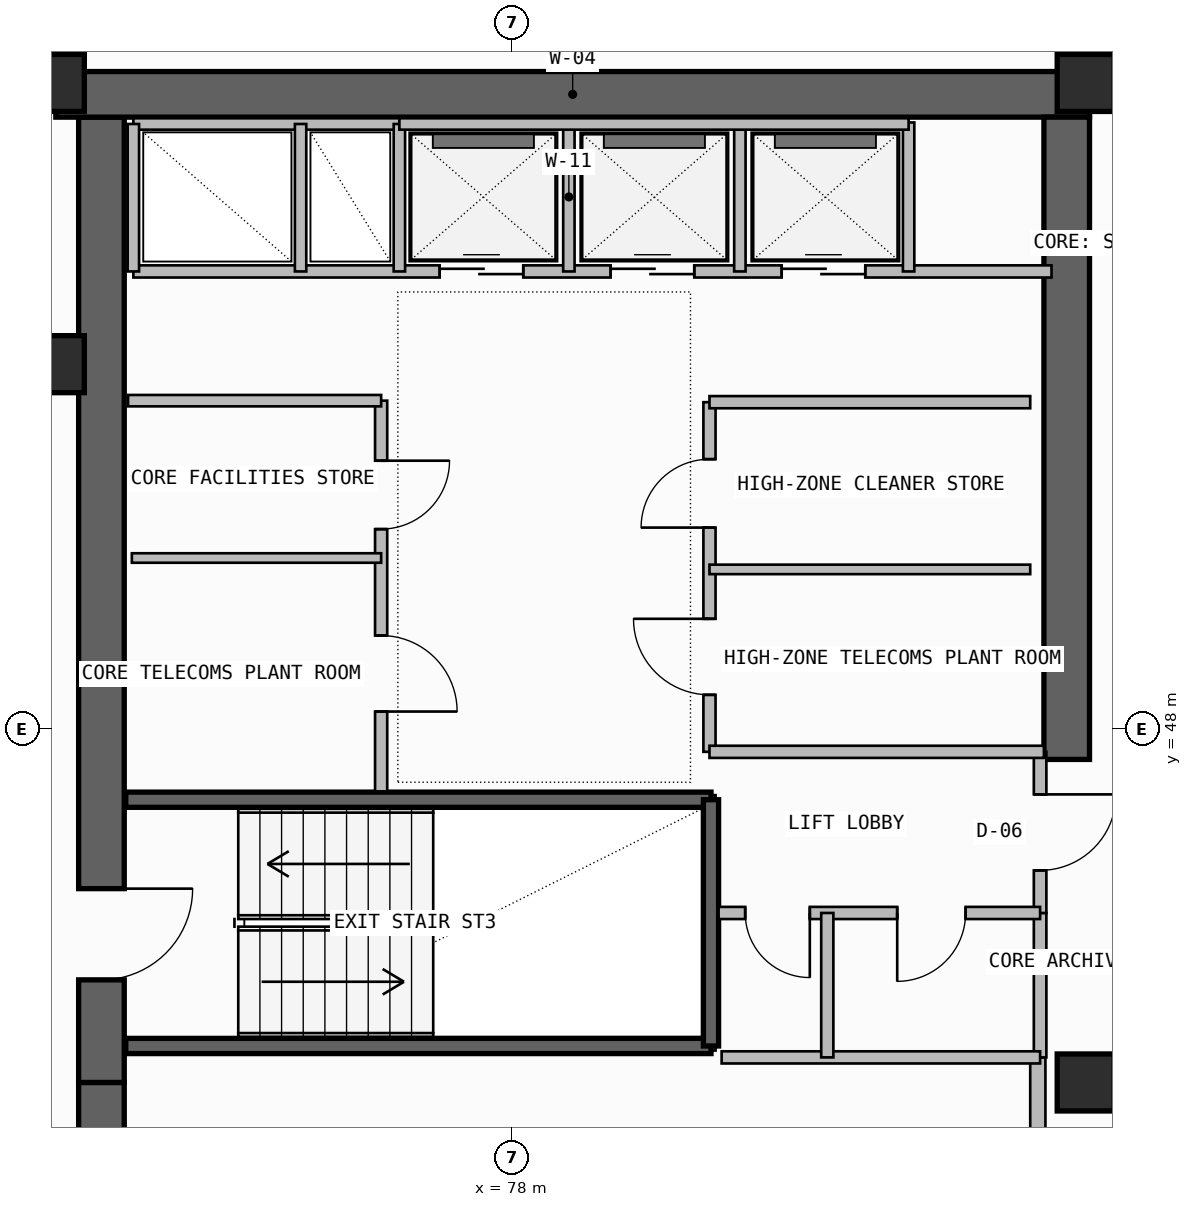
"""IFC4 building model, lengths in metres.
Left out: names, types, materials, properties, quantities, classifications, styles, units other than length and angle.
Written with IfcOpenShell. Run it as: python <this file> out.ifc"""

import sys

from ifc_helpers import new_model, si_unit, direction, frame, frame_2d, origin, origin_2d, place, context, subcontext, project, spatial, rectangle, extrude, element, fill, save


model = new_model("IFC4")
c1 = context("Model", 3, precision=1e-05, world=origin(), true_north=direction((0.0, 1.0)))
c2 = subcontext(c1, "Body", "Model", "MODEL_VIEW")
j1 = project(units=[si_unit("LENGTHUNIT", "METRE"), si_unit("PLANEANGLEUNIT", "RADIAN")], contexts=[c1])
p1 = place(None, origin())
s1 = spatial("IfcSite", under=j1, at=p1, CompositionType="ELEMENT")
p2 = place(p1, origin())
s2 = spatial("IfcBuilding", under=s1, at=p2, CompositionType="ELEMENT")
p3 = place(p2, frame((0.0, 0.0, 278.34)))
s3 = spatial("IfcBuildingStorey", under=s2, at=p3, CompositionType="ELEMENT", Elevation=278.34)
p4 = place(p3, frame((72.6, 35.5, -0.26), z_axis=(0.0, 0.0, 1.0), x_axis=(0.0, 1.0, 0.0)))
e1 = element("IfcWall", 1, at=p4, inside=s3, PredefinedType="SHEAR", context=c2, shape_type="SweptSolid", body=[
    extrude(rectangle(XDim=7.85, YDim=0.6, at=frame_2d((3.925, 0.0))), origin(), (0.0, 0.0, 1.0), 3.52),
])
p5 = place(p4, frame((1.45, 0.0, 0.26)))
e2 = element("IfcOpeningElement", 2, at=p5, cuts=e1, PredefinedType="OPENING", context=c2, shape_type="SweptSolid", body=[
    extrude(rectangle(XDim=1.2, YDim=2.2, at=frame_2d((0.6, 1.1))), frame((0.0, 0.31, 0.0), z_axis=(0.0, -1.0, 0.0), x_axis=(1.0, 0.0, 0.0)), (0.0, 0.0, 1.0), 0.62),
])
p6 = place(p3, frame((72.6, 43.35, -0.26), z_axis=(0.0, 0.0, 1.0), x_axis=(0.0, 1.0, 0.0)))
e3 = element("IfcWall", 3, at=p6, inside=s3, PredefinedType="SHEAR", context=c2, shape_type="SweptSolid", body=[
    extrude(rectangle(XDim=12.7, YDim=0.6, at=frame_2d((6.35, 0.0))), origin(), (0.0, 0.0, 1.0), 3.52),
])
p7 = place(p6, frame((1.35, 0.0, 0.26)))
e4 = element("IfcOpeningElement", 4, at=p7, cuts=e3, PredefinedType="OPENING", context=c2, shape_type="SweptSolid", body=[
    extrude(rectangle(XDim=1.2, YDim=2.2, at=frame_2d((0.6, 1.1))), frame((0.0, 0.31, 0.0), z_axis=(0.0, -1.0, 0.0), x_axis=(1.0, 0.0, 0.0)), (0.0, 0.0, 1.0), 0.62),
])
p8 = place(p3, frame((72.0, 56.35, -0.26), z_axis=(0.0, 0.0, 1.0), x_axis=(1.0, 0.0, 0.0)))
e5 = element("IfcWall", 5, at=p8, inside=s3, PredefinedType="SHEAR", context=c2, shape_type="SweptSolid", body=[
    extrude(rectangle(XDim=13.6, YDim=0.6, at=frame_2d((6.8, 0.0))), origin(), (0.0, 0.0, 1.0), 3.52),
])
p9 = place(p3, frame((85.3, 47.6, -0.26), z_axis=(0.0, 0.0, 1.0), x_axis=(0.0, 1.0, 0.0)))
e6 = element("IfcWall", 6, at=p9, inside=s3, PredefinedType="SHEAR", context=c2, shape_type="SweptSolid", body=[
    extrude(rectangle(XDim=8.45, YDim=0.6, at=frame_2d((4.225, 0.0))), origin(), (0.0, 0.0, 1.0), 3.52),
])
for number, where, z_axis, x_axis in (
    (7, (85.55, 43.35, 0.0), (0.0, 0.0, 1.0), (1.0, 0.0, 0.0)),
    (8, (72.0, 52.8, 0.0), (0.0, 0.0, 1.0), (1.0, 0.0, 0.0)),
    (9, (72.0, 56.5, 0.0), (0.0, 0.0, 1.0), (1.0, 0.0, 0.0)),
    (10, (85.55, 56.5, 0.0), (0.0, 0.0, 1.0), (1.0, 0.0, 0.0)),
):
    element("IfcColumn", number, at=place(p3, frame(where, z_axis=z_axis, x_axis=x_axis)), inside=s3, PredefinedType="COLUMN", context=c2, shape_type="SweptSolid", body=[
        extrude(rectangle(XDim=0.75, YDim=0.75, at=origin_2d()), origin(), (0.0, 0.0, 1.0), 3.52),
    ])
p10 = place(p3, frame((84.92, 38.85, 0.0), z_axis=(0.0, 0.0, 1.0), x_axis=(0.0, 1.0, 0.0)))
e11 = element("IfcWall", 11, at=p10, inside=s3, PredefinedType="SOLIDWALL", context=c2, shape_type="SweptSolid", body=[
    extrude(rectangle(XDim=4.83, YDim=0.2, at=frame_2d((2.415, 0.0))), origin(), (0.0, 0.0, 1.0), 3.26),
])
p11 = place(p10, frame((1.25, 0.0, 0.0)))
e12 = element("IfcOpeningElement", 12, at=p11, cuts=e11, PredefinedType="OPENING", context=c2, shape_type="SweptSolid", body=[
    extrude(rectangle(XDim=1.1, YDim=2.2, at=frame_2d((0.55, 1.1))), frame((0.0, 0.11, 0.0), z_axis=(0.0, -1.0, 0.0), x_axis=(1.0, 0.0, 0.0)), (0.0, 0.0, 1.0), 0.22),
])
for number, where, z_axis, x_axis in (
    (13, (72.92, 43.83, -0.26), (0.0, 0.0, 1.0), (1.0, 0.0, 0.0)),
    (14, (72.92, 47.07, -0.26), (0.0, 0.0, 1.0), (1.0, 0.0, 0.0)),
):
    element("IfcWall", number, at=place(p3, frame(where, z_axis=z_axis, x_axis=x_axis)), inside=s3, PredefinedType="SOLIDWALL", context=c2, shape_type="SweptSolid", body=[
        extrude(rectangle(XDim=7.7, YDim=0.2, at=frame_2d((3.85, 0.0))), origin(), (0.0, 0.0, 1.0), 3.52),
    ])
p12 = place(p3, frame((80.62, 43.83, -0.26), z_axis=(0.0, 0.0, 1.0), x_axis=(0.0, 1.0, 0.0)))
e15 = element("IfcWall", 15, at=p12, inside=s3, PredefinedType="SOLIDWALL", context=c2, shape_type="SweptSolid", body=[
    extrude(rectangle(XDim=3.24, YDim=0.2, at=frame_2d((1.62, 0.0))), origin(), (0.0, 0.0, 1.0), 3.52),
])
p13 = place(p3, frame((84.95, 43.68, 0.0), z_axis=(0.0, 0.0, 1.0), x_axis=(0.0, 1.0, 0.0)))
e16 = element("IfcWall", 16, at=p13, inside=s3, PredefinedType="PLUMBINGWALL", context=c2, shape_type="SweptSolid", body=[
    extrude(rectangle(XDim=1.9, YDim=0.165, at=frame_2d((0.95, 0.0))), origin(), (0.0, 0.0, 1.0), 3.26),
])
p14 = place(p3, frame((84.95, 45.58, 0.0), z_axis=(0.0, 0.0, 1.0), x_axis=(0.0, 1.0, 0.0)))
e17 = element("IfcWall", 17, at=p14, inside=s3, PredefinedType="PARTITIONING", context=c2, shape_type="SweptSolid", body=[
    extrude(rectangle(XDim=2.12, YDim=0.165, at=frame_2d((1.06, 0.0))), origin(), (0.0, 0.0, 1.0), 3.26),
])
p15 = place(p14, frame((0.56, 0.0, 0.0)))
e18 = element("IfcOpeningElement", 18, at=p15, cuts=e17, PredefinedType="OPENING", context=c2, shape_type="SweptSolid", body=[
    extrude(rectangle(XDim=1.0, YDim=2.2, at=frame_2d((0.5, 1.1))), frame((0.0, 0.093, 0.0), z_axis=(0.0, -1.0, 0.0), x_axis=(1.0, 0.0, 0.0)), (0.0, 0.0, 1.0), 0.185),
])
p16 = place(p3, frame((80.72, 45.58, 0.0), z_axis=(0.0, 0.0, 1.0), x_axis=(1.0, 0.0, 0.0)))
e19 = element("IfcWall", 19, at=p16, inside=s3, PredefinedType="PLUMBINGWALL", context=c2, shape_type="SweptSolid", body=[
    extrude(rectangle(XDim=4.23, YDim=0.16, at=frame_2d((2.115, 0.0))), origin(), (0.0, 0.0, 1.0), 3.26),
])
p17 = place(p16, frame((0.35, 0.0, 0.0)))
e20 = element("IfcOpeningElement", 20, at=p17, cuts=e19, PredefinedType="OPENING", context=c2, shape_type="SweptSolid", body=[
    extrude(rectangle(XDim=0.85, YDim=2.05, at=frame_2d((0.425, 1.025))), frame((0.0, 0.09, 0.0), z_axis=(0.0, -1.0, 0.0), x_axis=(1.0, 0.0, 0.0)), (0.0, 0.0, 1.0), 0.18),
])
p18 = place(p16, frame((2.35, 0.0, 0.0)))
e21 = element("IfcOpeningElement", 21, at=p18, cuts=e19, PredefinedType="OPENING", context=c2, shape_type="SweptSolid", body=[
    extrude(rectangle(XDim=0.9, YDim=2.1, at=frame_2d((0.45, 1.05))), frame((0.0, 0.09, 0.0), z_axis=(0.0, -1.0, 0.0), x_axis=(1.0, 0.0, 0.0)), (0.0, 0.0, 1.0), 0.18),
])
p19 = place(p3, frame((80.76, 43.68, 0.0), z_axis=(0.0, 0.0, 1.0), x_axis=(1.0, 0.0, 0.0)))
e22 = element("IfcWall", 22, at=p19, inside=s3, PredefinedType="PLUMBINGWALL", context=c2, shape_type="SweptSolid", body=[
    extrude(rectangle(XDim=4.19, YDim=0.16, at=frame_2d((2.095, 0.0))), origin(), (0.0, 0.0, 1.0), 3.26),
])
p20 = place(p3, frame((82.15, 43.68, 0.0), z_axis=(0.0, 0.0, 1.0), x_axis=(0.0, 1.0, 0.0)))
e23 = element("IfcWall", 23, at=p20, inside=s3, PredefinedType="PLUMBINGWALL", context=c2, shape_type="SweptSolid", body=[
    extrude(rectangle(XDim=1.9, YDim=0.16, at=frame_2d((0.95, 0.0))), origin(), (0.0, 0.0, 1.0), 3.26),
])
p21 = place(p3, frame((76.28, 47.18, 0.0), z_axis=(0.0, 0.0, 1.0), x_axis=(0.0, 1.0, 0.0)))
e24 = element("IfcWall", 24, at=p21, inside=s3, PredefinedType="SOLIDWALL", context=c2, shape_type="SweptSolid", body=[
    extrude(rectangle(XDim=5.14, YDim=0.16, at=frame_2d((2.57, 0.0))), origin(), (0.0, 0.0, 1.0), 3.26),
])
p22 = place(p21, frame((1.05, 0.0, 0.0)))
e25 = element("IfcOpeningElement", 25, at=p22, cuts=e24, PredefinedType="OPENING", context=c2, shape_type="SweptSolid", body=[
    extrude(rectangle(XDim=1.0, YDim=2.2, at=frame_2d((0.5, 1.1))), frame((0.0, 0.09, 0.0), z_axis=(0.0, -1.0, 0.0), x_axis=(1.0, 0.0, 0.0)), (0.0, 0.0, 1.0), 0.18),
])
p23 = place(p21, frame((3.45, 0.0, 0.0)))
e26 = element("IfcOpeningElement", 26, at=p23, cuts=e24, PredefinedType="OPENING", context=c2, shape_type="SweptSolid", body=[
    extrude(rectangle(XDim=0.9, YDim=2.1, at=frame_2d((0.45, 1.05))), frame((0.0, 0.09, 0.0), z_axis=(0.0, -1.0, 0.0), x_axis=(1.0, 0.0, 0.0)), (0.0, 0.0, 1.0), 0.18),
])
p24 = place(p3, frame((72.95, 52.32, 0.0), z_axis=(0.0, 0.0, 1.0), x_axis=(1.0, 0.0, 0.0)))
e27 = element("IfcWall", 27, at=p24, inside=s3, PredefinedType="SOLIDWALL", context=c2, shape_type="SweptSolid", body=[
    extrude(rectangle(XDim=3.33, YDim=0.15, at=frame_2d((1.665, 0.0))), origin(), (0.0, 0.0, 1.0), 3.26),
])
p25 = place(p3, frame((73.0, 50.25, 0.0), z_axis=(0.0, 0.0, 1.0), x_axis=(1.0, 0.0, 0.0)))
e28 = element("IfcWall", 28, at=p25, inside=s3, PredefinedType="PARTITIONING", context=c2, shape_type="SweptSolid", body=[
    extrude(rectangle(XDim=3.28, YDim=0.125, at=frame_2d((1.64, 0.0))), origin(), (0.0, 0.0, 1.0), 3.26),
])
p26 = place(p3, frame((80.6, 47.7, 0.0), z_axis=(0.0, 0.0, 1.0), x_axis=(0.0, 1.0, 0.0)))
e29 = element("IfcWall", 29, at=p26, inside=s3, PredefinedType="SOLIDWALL", context=c2, shape_type="SweptSolid", body=[
    extrude(rectangle(XDim=4.6, YDim=0.16, at=frame_2d((2.3, 0.0))), origin(), (0.0, 0.0, 1.0), 3.26),
])
p27 = place(p26, frame((0.75, 0.0, 0.0)))
e30 = element("IfcOpeningElement", 30, at=p27, cuts=e29, PredefinedType="OPENING", context=c2, shape_type="SweptSolid", body=[
    extrude(rectangle(XDim=1.0, YDim=2.2, at=frame_2d((0.5, 1.1))), frame((0.0, 0.09, 0.0), z_axis=(0.0, -1.0, 0.0), x_axis=(1.0, 0.0, 0.0)), (0.0, 0.0, 1.0), 0.18),
])
p28 = place(p26, frame((2.95, 0.0, 0.0)))
e31 = element("IfcOpeningElement", 31, at=p28, cuts=e29, PredefinedType="OPENING", context=c2, shape_type="SweptSolid", body=[
    extrude(rectangle(XDim=0.9, YDim=2.1, at=frame_2d((0.45, 1.05))), frame((0.0, 0.09, 0.0), z_axis=(0.0, -1.0, 0.0), x_axis=(1.0, 0.0, 0.0)), (0.0, 0.0, 1.0), 0.18),
])
p29 = place(p3, frame((80.6, 47.7, 0.0), z_axis=(0.0, 0.0, 1.0), x_axis=(1.0, 0.0, 0.0)))
e32 = element("IfcWall", 32, at=p29, inside=s3, PredefinedType="SOLIDWALL", context=c2, shape_type="SweptSolid", body=[
    extrude(rectangle(XDim=4.4, YDim=0.16, at=frame_2d((2.2, 0.0))), origin(), (0.0, 0.0, 1.0), 3.26),
])
p30 = place(p3, frame((80.6, 52.3, 0.0), z_axis=(0.0, 0.0, 1.0), x_axis=(1.0, 0.0, 0.0)))
e33 = element("IfcWall", 33, at=p30, inside=s3, PredefinedType="SOLIDWALL", context=c2, shape_type="SweptSolid", body=[
    extrude(rectangle(XDim=4.22, YDim=0.16, at=frame_2d((2.11, 0.0))), origin(), (0.0, 0.0, 1.0), 3.26),
])
p31 = place(p3, frame((80.6, 50.1, 0.0), z_axis=(0.0, 0.0, 1.0), x_axis=(1.0, 0.0, 0.0)))
e34 = element("IfcWall", 34, at=p31, inside=s3, PredefinedType="PARTITIONING", context=c2, shape_type="SweptSolid", body=[
    extrude(rectangle(XDim=4.22, YDim=0.125, at=frame_2d((2.11, 0.0))), origin(), (0.0, 0.0, 1.0), 3.26),
])
p32 = place(p3, frame((73.02, 54.02, 0.0), z_axis=(0.0, 0.0, 1.0), x_axis=(1.0, 0.0, 0.0)))
e35 = element("IfcWall", 35, at=p32, inside=s3, PredefinedType="SOLIDWALL", context=c2, shape_type="SweptSolid", body=[
    extrude(rectangle(XDim=12.08, YDim=0.16, at=frame_2d((6.04, 0.0))), origin(), (0.0, 0.0, 1.0), 3.26),
])
p33 = place(p32, frame((4.03, 0.0, 0.0)))
e36 = element("IfcOpeningElement", 36, at=p33, cuts=e35, PredefinedType="OPENING", context=c2, shape_type="SweptSolid", body=[
    extrude(rectangle(XDim=1.1, YDim=2.25, at=frame_2d((0.55, 1.125))), frame((0.0, 0.09, 0.0), z_axis=(0.0, -1.0, 0.0), x_axis=(1.0, 0.0, 0.0)), (0.0, 0.0, 1.0), 0.18),
])
p34 = place(p32, frame((6.28, 0.0, 0.0)))
e37 = element("IfcOpeningElement", 37, at=p34, cuts=e35, PredefinedType="OPENING", context=c2, shape_type="SweptSolid", body=[
    extrude(rectangle(XDim=1.1, YDim=2.25, at=frame_2d((0.55, 1.125))), frame((0.0, 0.09, 0.0), z_axis=(0.0, -1.0, 0.0), x_axis=(1.0, 0.0, 0.0)), (0.0, 0.0, 1.0), 0.18),
])
p35 = place(p32, frame((8.53, 0.0, 0.0)))
e38 = element("IfcOpeningElement", 38, at=p35, cuts=e35, PredefinedType="OPENING", context=c2, shape_type="SweptSolid", body=[
    extrude(rectangle(XDim=1.1, YDim=2.25, at=frame_2d((0.55, 1.125))), frame((0.0, 0.09, 0.0), z_axis=(0.0, -1.0, 0.0), x_axis=(1.0, 0.0, 0.0)), (0.0, 0.0, 1.0), 0.18),
])
p36 = place(p3, frame((73.02, 55.96, 0.0), z_axis=(0.0, 0.0, 1.0), x_axis=(1.0, 0.0, 0.0)))
e39 = element("IfcWall", 39, at=p36, inside=s3, PredefinedType="SOLIDWALL", context=c2, shape_type="SweptSolid", body=[
    extrude(rectangle(XDim=3.5, YDim=0.15, at=frame_2d((1.75, 0.0))), origin(), (0.0, 0.0, 1.0), 3.26),
])
p37 = place(p3, frame((73.02, 54.02, 0.0), z_axis=(0.0, 0.0, 1.0), x_axis=(0.0, 1.0, 0.0)))
e40 = element("IfcWall", 40, at=p37, inside=s3, PredefinedType="PLUMBINGWALL", context=c2, shape_type="SweptSolid", body=[
    extrude(rectangle(XDim=1.94, YDim=0.15, at=frame_2d((0.97, 0.0))), origin(), (0.0, 0.0, 1.0), 3.26),
])
p38 = place(p3, frame((76.52, 54.02, 0.0), z_axis=(0.0, 0.0, 1.0), x_axis=(0.0, 1.0, 0.0)))
e41 = element("IfcWall", 41, at=p38, inside=s3, PredefinedType="SOLIDWALL", context=c2, shape_type="SweptSolid", body=[
    extrude(rectangle(XDim=1.94, YDim=0.15, at=frame_2d((0.97, 0.0))), origin(), (0.0, 0.0, 1.0), 3.26),
])
p39 = place(p3, frame((75.22, 54.02, 0.0), z_axis=(0.0, 0.0, 1.0), x_axis=(0.0, 1.0, 0.0)))
e42 = element("IfcWall", 42, at=p39, inside=s3, PredefinedType="PLUMBINGWALL", context=c2, shape_type="SweptSolid", body=[
    extrude(rectangle(XDim=1.94, YDim=0.15, at=frame_2d((0.97, 0.0))), origin(), (0.0, 0.0, 1.0), 3.26),
])
for number, where, z_axis, x_axis in (
    (43, (78.75, 54.02, 0.0), (0.0, 0.0, 1.0), (0.0, 1.0, 0.0)),
    (44, (81.0, 54.02, 0.0), (0.0, 0.0, 1.0), (0.0, 1.0, 0.0)),
):
    element("IfcWall", number, at=place(p3, frame(where, z_axis=z_axis, x_axis=x_axis)), inside=s3, PredefinedType="PLUMBINGWALL", context=c2, shape_type="SweptSolid", body=[
        extrude(rectangle(XDim=1.96, YDim=0.15, at=frame_2d((0.98, 0.0))), origin(), (0.0, 0.0, 1.0), 3.26),
    ])
p40 = place(p3, frame((83.22, 54.02, 0.0), z_axis=(0.0, 0.0, 1.0), x_axis=(0.0, 1.0, 0.0)))
e45 = element("IfcWall", 45, at=p40, inside=s3, PredefinedType="SOLIDWALL", context=c2, shape_type="SweptSolid", body=[
    extrude(rectangle(XDim=1.96, YDim=0.15, at=frame_2d((0.98, 0.0))), origin(), (0.0, 0.0, 1.0), 3.26),
])
p41 = place(p3, frame((76.52, 55.96, 0.0), z_axis=(0.0, 0.0, 1.0), x_axis=(1.0, 0.0, 0.0)))
e46 = element("IfcWall", 46, at=p41, inside=s3, PredefinedType="SOLIDWALL", context=c2, shape_type="SweptSolid", body=[
    extrude(rectangle(XDim=6.7, YDim=0.15, at=frame_2d((3.35, 0.0))), origin(), (0.0, 0.0, 1.0), 3.26),
])
p42 = place(p7, frame((1.2, 0.0, 0.0), z_axis=(0.0, 0.0, 1.0), x_axis=(-1.0, 0.0, 0.0)))
e47 = element("IfcDoor", 47, at=p42, inside=s3, OperationType="SINGLE_SWING_LEFT", PredefinedType="USERDEFINED", context=c2, shape_type="SweptSolid", body=[
    extrude(rectangle(XDim=1.2, YDim=2.2, at=frame_2d((0.6, 1.1))), frame((0.0, 0.025, 0.0), z_axis=(0.0, -1.0, 0.0), x_axis=(1.0, 0.0, 0.0)), (0.0, 0.0, 1.0), 0.05),
])
fill(e4, e47)
p43 = place(p15, frame((1.0, 0.0, 0.0), z_axis=(0.0, 0.0, 1.0), x_axis=(-1.0, 0.0, 0.0)))
e48 = element("IfcDoor", 48, at=p43, inside=s3, OperationType="SINGLE_SWING_LEFT", PredefinedType="DOOR", context=c2, shape_type="SweptSolid", body=[
    extrude(rectangle(XDim=1.0, YDim=2.2, at=frame_2d((0.5, 1.1))), frame((0.0, 0.025, 0.0), z_axis=(0.0, -1.0, 0.0), x_axis=(1.0, 0.0, 0.0)), (0.0, 0.0, 1.0), 0.05),
])
fill(e18, e48)
p44 = place(p17, frame((0.85, 0.0, 0.0), z_axis=(0.0, 0.0, 1.0), x_axis=(-1.0, 0.0, 0.0)))
e49 = element("IfcDoor", 49, at=p44, inside=s3, OperationType="SINGLE_SWING_LEFT", PredefinedType="DOOR", context=c2, shape_type="SweptSolid", body=[
    extrude(rectangle(XDim=0.85, YDim=2.05, at=frame_2d((0.425, 1.025))), frame((0.0, 0.025, 0.0), z_axis=(0.0, -1.0, 0.0), x_axis=(1.0, 0.0, 0.0)), (0.0, 0.0, 1.0), 0.05),
])
fill(e20, e49)
p45 = place(p18, frame((0.9, 0.0, 0.0), z_axis=(0.0, 0.0, 1.0), x_axis=(-1.0, 0.0, 0.0)))
e50 = element("IfcDoor", 50, at=p45, inside=s3, OperationType="SINGLE_SWING_RIGHT", PredefinedType="DOOR", context=c2, shape_type="SweptSolid", body=[
    extrude(rectangle(XDim=0.9, YDim=2.1, at=frame_2d((0.45, 1.05))), frame((0.0, 0.025, 0.0), z_axis=(0.0, -1.0, 0.0), x_axis=(1.0, 0.0, 0.0)), (0.0, 0.0, 1.0), 0.05),
])
fill(e21, e50)
p46 = place(p22, frame((1.0, 0.0, 0.0), z_axis=(0.0, 0.0, 1.0), x_axis=(-1.0, 0.0, 0.0)))
e51 = element("IfcDoor", 51, at=p46, inside=s3, OperationType="SINGLE_SWING_RIGHT", PredefinedType="DOOR", context=c2, shape_type="SweptSolid", body=[
    extrude(rectangle(XDim=1.0, YDim=2.2, at=frame_2d((0.5, 1.1))), frame((0.0, 0.025, 0.0), z_axis=(0.0, -1.0, 0.0), x_axis=(1.0, 0.0, 0.0)), (0.0, 0.0, 1.0), 0.05),
])
fill(e25, e51)
p47 = place(p23, frame((0.9, 0.0, 0.0), z_axis=(0.0, 0.0, 1.0), x_axis=(-1.0, 0.0, 0.0)))
e52 = element("IfcDoor", 52, at=p47, inside=s3, OperationType="SINGLE_SWING_LEFT", PredefinedType="DOOR", context=c2, shape_type="SweptSolid", body=[
    extrude(rectangle(XDim=0.9, YDim=2.1, at=frame_2d((0.45, 1.05))), frame((0.0, 0.025, 0.0), z_axis=(0.0, -1.0, 0.0), x_axis=(1.0, 0.0, 0.0)), (0.0, 0.0, 1.0), 0.05),
])
fill(e26, e52)
p48 = place(p27, origin())
e53 = element("IfcDoor", 53, at=p48, inside=s3, OperationType="SINGLE_SWING_RIGHT", PredefinedType="DOOR", context=c2, shape_type="SweptSolid", body=[
    extrude(rectangle(XDim=1.0, YDim=2.2, at=frame_2d((0.5, 1.1))), frame((0.0, 0.025, 0.0), z_axis=(0.0, -1.0, 0.0), x_axis=(1.0, 0.0, 0.0)), (0.0, 0.0, 1.0), 0.05),
])
fill(e30, e53)
p49 = place(p28, origin())
e54 = element("IfcDoor", 54, at=p49, inside=s3, OperationType="SINGLE_SWING_LEFT", PredefinedType="DOOR", context=c2, shape_type="SweptSolid", body=[
    extrude(rectangle(XDim=0.9, YDim=2.1, at=frame_2d((0.45, 1.05))), frame((0.0, 0.025, 0.0), z_axis=(0.0, -1.0, 0.0), x_axis=(1.0, 0.0, 0.0)), (0.0, 0.0, 1.0), 0.05),
])
fill(e31, e54)
p50 = place(p33, origin())
e55 = element("IfcDoor", 55, at=p50, inside=s3, OperationType="DOUBLE_DOOR_SLIDING", PredefinedType="DOOR", context=c2, shape_type="SweptSolid", body=[
    extrude(rectangle(XDim=1.1, YDim=2.25, at=frame_2d((0.55, 1.125))), frame((0.0, 0.025, 0.0), z_axis=(0.0, -1.0, 0.0), x_axis=(1.0, 0.0, 0.0)), (0.0, 0.0, 1.0), 0.05),
])
fill(e36, e55)
p51 = place(p34, origin())
e56 = element("IfcDoor", 56, at=p51, inside=s3, OperationType="DOUBLE_DOOR_SLIDING", PredefinedType="DOOR", context=c2, shape_type="SweptSolid", body=[
    extrude(rectangle(XDim=1.1, YDim=2.25, at=frame_2d((0.55, 1.125))), frame((0.0, 0.025, 0.0), z_axis=(0.0, -1.0, 0.0), x_axis=(1.0, 0.0, 0.0)), (0.0, 0.0, 1.0), 0.05),
])
fill(e37, e56)
p52 = place(p35, origin())
e57 = element("IfcDoor", 57, at=p52, inside=s3, OperationType="DOUBLE_DOOR_SLIDING", PredefinedType="DOOR", context=c2, shape_type="SweptSolid", body=[
    extrude(rectangle(XDim=1.1, YDim=2.25, at=frame_2d((0.55, 1.125))), frame((0.0, 0.025, 0.0), z_axis=(0.0, -1.0, 0.0), x_axis=(1.0, 0.0, 0.0)), (0.0, 0.0, 1.0), 0.05),
])
fill(e38, e57)
save(model, sys.argv[1])
